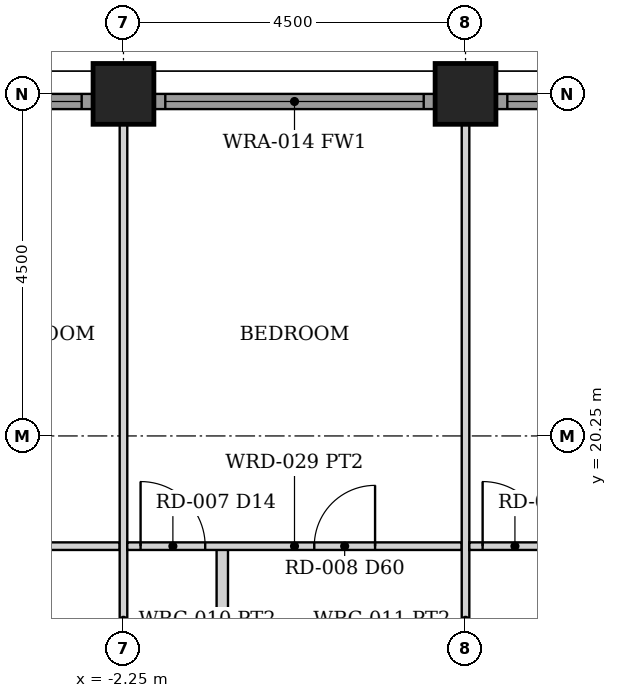
"""IFC4 building model, lengths in metres.
Left out: names, types, materials, properties, quantities, classifications, styles, units other than length and angle.
Written with IfcOpenShell. Run it as: python <this file> out.ifc"""

import sys

from ifc_helpers import new_model, si_unit, direction, frame, frame_2d, origin, origin_2d, place, context, subcontext, project, spatial, rectangle, hollow_rectangle, extrude, element, fill, save


model = new_model("IFC4")
c1 = context("Model", 3, precision=1e-05, world=origin(), true_north=direction((0.0, 1.0)))
c2 = subcontext(c1, "Body", "Model", "MODEL_VIEW")
j1 = project(units=[si_unit("LENGTHUNIT", "METRE"), si_unit("PLANEANGLEUNIT", "RADIAN")], contexts=[c1])
p1 = place(None, origin())
s1 = spatial("IfcSite", under=j1, at=p1, CompositionType="ELEMENT")
p2 = place(p1, origin())
s2 = spatial("IfcBuilding", under=s1, at=p2, CompositionType="ELEMENT")
p3 = place(p2, frame((0.0, 0.0, 58.0)))
s3 = spatial("IfcBuildingStorey", under=s2, at=p3, CompositionType="ELEMENT", Elevation=58.0)
for number, where, z_axis, x_axis in (
    (1, (-2.25, 24.75, 0.0), (0.0, 0.0, 1.0), (0.0, 1.0, 0.0)),
    (2, (2.25, 24.75, 0.0), (0.0, 0.0, 1.0), (0.0, 1.0, 0.0)),
):
    element("IfcColumn", number, at=place(p3, frame(where, z_axis=z_axis, x_axis=x_axis)), inside=s3, PredefinedType="COLUMN", context=c2, shape_type="SweptSolid", body=[
        extrude(hollow_rectangle(XDim=0.8, YDim=0.8, WallThickness=0.06, at=origin_2d()), origin(), (0.0, 0.0, 1.0), 3.5),
    ])
p4 = place(p3, frame((-6.345, 24.65, 0.0), z_axis=(0.0, 0.0, 1.0), x_axis=(1.0, 0.0, 0.0)))
e3 = element("IfcWall", 3, at=p4, inside=s3, PredefinedType="SOLIDWALL", context=c2, shape_type="SweptSolid", body=[
    extrude(rectangle(XDim=3.69, YDim=0.2, at=frame_2d((1.845, 0.0))), origin(), (0.0, 0.0, 1.0), 2.379),
])
p5 = place(p4, frame((0.145, 0.0, 0.3)))
e4 = element("IfcOpeningElement", 4, at=p5, cuts=e3, PredefinedType="OPENING", context=c2, shape_type="SweptSolid", body=[
    extrude(rectangle(XDim=3.4, YDim=1.929, at=frame_2d((1.7, 0.964))), frame((0.0, 0.11, 0.0), z_axis=(0.0, -1.0, 0.0), x_axis=(1.0, 0.0, 0.0)), (0.0, 0.0, 1.0), 0.22),
])
p6 = place(p3, frame((-1.845, 24.65, 0.0), z_axis=(0.0, 0.0, 1.0), x_axis=(1.0, 0.0, 0.0)))
e5 = element("IfcWall", 5, at=p6, inside=s3, PredefinedType="SOLIDWALL", context=c2, shape_type="SweptSolid", body=[
    extrude(rectangle(XDim=3.69, YDim=0.2, at=frame_2d((1.845, 0.0))), origin(), (0.0, 0.0, 1.0), 2.379),
])
p7 = place(p6, frame((0.145, 0.0, 0.3)))
e6 = element("IfcOpeningElement", 6, at=p7, cuts=e5, PredefinedType="OPENING", context=c2, shape_type="SweptSolid", body=[
    extrude(rectangle(XDim=3.4, YDim=1.929, at=frame_2d((1.7, 0.964))), frame((0.0, 0.11, 0.0), z_axis=(0.0, -1.0, 0.0), x_axis=(1.0, 0.0, 0.0)), (0.0, 0.0, 1.0), 0.22),
])
p8 = place(p3, frame((2.655, 24.65, 0.0), z_axis=(0.0, 0.0, 1.0), x_axis=(1.0, 0.0, 0.0)))
e7 = element("IfcWall", 7, at=p8, inside=s3, PredefinedType="SOLIDWALL", context=c2, shape_type="SweptSolid", body=[
    extrude(rectangle(XDim=3.69, YDim=0.2, at=frame_2d((1.845, 0.0))), origin(), (0.0, 0.0, 1.0), 2.379),
])
p9 = place(p8, frame((0.145, 0.0, 0.3)))
e8 = element("IfcOpeningElement", 8, at=p9, cuts=e7, PredefinedType="OPENING", context=c2, shape_type="SweptSolid", body=[
    extrude(rectangle(XDim=3.4, YDim=1.929, at=frame_2d((1.7, 0.964))), frame((0.0, 0.11, 0.0), z_axis=(0.0, -1.0, 0.0), x_axis=(1.0, 0.0, 0.0)), (0.0, 0.0, 1.0), 0.22),
])
p10 = place(p3, frame((-6.69, 18.8, 0.0), z_axis=(0.0, 0.0, 1.0), x_axis=(1.0, 0.0, 0.0)))
e9 = element("IfcWall", 9, at=p10, inside=s3, PredefinedType="PARTITIONING", context=c2, shape_type="SweptSolid", body=[
    extrude(rectangle(XDim=4.39, YDim=0.1, at=frame_2d((2.195, 0.0))), origin(), (0.0, 0.0, 1.0), 2.373),
])
p11 = place(p10, frame((0.14, 0.0, 0.0)))
e10 = element("IfcOpeningElement", 10, at=p11, cuts=e9, PredefinedType="OPENING", context=c2, shape_type="SweptSolid", body=[
    extrude(rectangle(XDim=0.9, YDim=2.1, at=frame_2d((0.45, 1.05))), frame((0.0, 0.06, 0.0), z_axis=(0.0, -1.0, 0.0), x_axis=(1.0, 0.0, 0.0)), (0.0, 0.0, 1.0), 0.12),
])
p12 = place(p3, frame((-2.25, 11.3, 0.0), z_axis=(0.0, 0.0, 1.0), x_axis=(0.0, 1.0, 0.0)))
e11 = element("IfcWall", 11, at=p12, inside=s3, PredefinedType="PARTITIONING", context=c2, shape_type="SweptSolid", body=[
    extrude(rectangle(XDim=13.05, YDim=0.1, at=frame_2d((6.525, 0.0))), origin(), (0.0, 0.0, 1.0), 2.373),
])
p13 = place(p3, frame((-0.95, 11.3, 0.0), z_axis=(0.0, 0.0, 1.0), x_axis=(0.0, 1.0, 0.0)))
e12 = element("IfcWall", 12, at=p13, inside=s3, PredefinedType="PARTITIONING", context=c2, shape_type="SweptSolid", body=[
    extrude(rectangle(XDim=7.5, YDim=0.15, at=frame_2d((3.75, 0.0))), origin(), (0.0, 0.0, 1.0), 2.373),
])
p14 = place(p13, frame((0.85, 0.0, 0.0)))
e13 = element("IfcOpeningElement", 13, at=p14, cuts=e12, PredefinedType="OPENING", context=c2, shape_type="SweptSolid", body=[
    extrude(rectangle(XDim=0.9, YDim=2.1, at=frame_2d((0.45, 1.05))), frame((0.0, 0.085, 0.0), z_axis=(0.0, -1.0, 0.0), x_axis=(1.0, 0.0, 0.0)), (0.0, 0.0, 1.0), 0.17),
])
p15 = place(p3, frame((-2.2, 18.8, 0.0), z_axis=(0.0, 0.0, 1.0), x_axis=(1.0, 0.0, 0.0)))
e14 = element("IfcWall", 14, at=p15, inside=s3, PredefinedType="PARTITIONING", context=c2, shape_type="SweptSolid", body=[
    extrude(rectangle(XDim=4.4, YDim=0.1, at=frame_2d((2.2, 0.0))), origin(), (0.0, 0.0, 1.0), 2.373),
])
p16 = place(p15, frame((0.175, 0.0, 0.0)))
e15 = element("IfcOpeningElement", 15, at=p16, cuts=e14, PredefinedType="OPENING", context=c2, shape_type="SweptSolid", body=[
    extrude(rectangle(XDim=0.85, YDim=2.1, at=frame_2d((0.425, 1.05))), frame((0.0, 0.06, 0.0), z_axis=(0.0, -1.0, 0.0), x_axis=(1.0, 0.0, 0.0)), (0.0, 0.0, 1.0), 0.12),
])
p17 = place(p15, frame((2.46, 0.0, 0.0)))
e16 = element("IfcOpeningElement", 16, at=p17, cuts=e14, PredefinedType="OPENING", context=c2, shape_type="SweptSolid", body=[
    extrude(rectangle(XDim=0.8, YDim=2.1, at=frame_2d((0.4, 1.05))), frame((0.0, 0.06, 0.0), z_axis=(0.0, -1.0, 0.0), x_axis=(1.0, 0.0, 0.0)), (0.0, 0.0, 1.0), 0.12),
])
p18 = place(p3, frame((2.25, 11.3, 0.0), z_axis=(0.0, 0.0, 1.0), x_axis=(0.0, 1.0, 0.0)))
e17 = element("IfcWall", 17, at=p18, inside=s3, PredefinedType="PARTITIONING", context=c2, shape_type="SweptSolid", body=[
    extrude(rectangle(XDim=13.05, YDim=0.1, at=frame_2d((6.525, 0.0))), origin(), (0.0, 0.0, 1.0), 2.373),
])
p19 = place(p3, frame((2.3, 18.8, 0.0), z_axis=(0.0, 0.0, 1.0), x_axis=(1.0, 0.0, 0.0)))
e18 = element("IfcWall", 18, at=p19, inside=s3, PredefinedType="PARTITIONING", context=c2, shape_type="SweptSolid", body=[
    extrude(rectangle(XDim=4.39, YDim=0.1, at=frame_2d((2.195, 0.0))), origin(), (0.0, 0.0, 1.0), 2.373),
])
p20 = place(p19, frame((0.175, 0.0, 0.0)))
e19 = element("IfcOpeningElement", 19, at=p20, cuts=e18, PredefinedType="OPENING", context=c2, shape_type="SweptSolid", body=[
    extrude(rectangle(XDim=0.85, YDim=2.1, at=frame_2d((0.425, 1.05))), frame((0.0, 0.06, 0.0), z_axis=(0.0, -1.0, 0.0), x_axis=(1.0, 0.0, 0.0)), (0.0, 0.0, 1.0), 0.12),
])
p21 = place(p19, frame((2.46, 0.0, 0.0)))
e20 = element("IfcOpeningElement", 20, at=p21, cuts=e18, PredefinedType="OPENING", context=c2, shape_type="SweptSolid", body=[
    extrude(rectangle(XDim=0.8, YDim=2.1, at=frame_2d((0.4, 1.05))), frame((0.0, 0.06, 0.0), z_axis=(0.0, -1.0, 0.0), x_axis=(1.0, 0.0, 0.0)), (0.0, 0.0, 1.0), 0.12),
])
p22 = place(p5, origin())
e21 = element("IfcWindow", 21, at=p22, inside=s3, PartitioningType="SINGLE_PANEL", PredefinedType="WINDOW", context=c2, shape_type="SweptSolid", body=[
    extrude(rectangle(XDim=3.4, YDim=1.929, at=frame_2d((1.7, 0.964))), frame((0.0, 0.03, 0.0), z_axis=(0.0, -1.0, 0.0), x_axis=(1.0, 0.0, 0.0)), (0.0, 0.0, 1.0), 0.06),
])
fill(e4, e21)
p23 = place(p7, origin())
e22 = element("IfcWindow", 22, at=p23, inside=s3, PartitioningType="SINGLE_PANEL", PredefinedType="WINDOW", context=c2, shape_type="SweptSolid", body=[
    extrude(rectangle(XDim=3.4, YDim=1.929, at=frame_2d((1.7, 0.964))), frame((0.0, 0.03, 0.0), z_axis=(0.0, -1.0, 0.0), x_axis=(1.0, 0.0, 0.0)), (0.0, 0.0, 1.0), 0.06),
])
fill(e6, e22)
p24 = place(p9, origin())
e23 = element("IfcWindow", 23, at=p24, inside=s3, PartitioningType="SINGLE_PANEL", PredefinedType="WINDOW", context=c2, shape_type="SweptSolid", body=[
    extrude(rectangle(XDim=3.4, YDim=1.929, at=frame_2d((1.7, 0.964))), frame((0.0, 0.03, 0.0), z_axis=(0.0, -1.0, 0.0), x_axis=(1.0, 0.0, 0.0)), (0.0, 0.0, 1.0), 0.06),
])
fill(e8, e23)
p25 = place(p16, origin())
e24 = element("IfcDoor", 24, at=p25, inside=s3, OperationType="SINGLE_SWING_LEFT", PredefinedType="DOOR", context=c2, shape_type="SweptSolid", body=[
    extrude(rectangle(XDim=0.85, YDim=2.1, at=frame_2d((0.425, 1.05))), frame((0.0, 0.025, 0.0), z_axis=(0.0, -1.0, 0.0), x_axis=(1.0, 0.0, 0.0)), (0.0, 0.0, 1.0), 0.05),
])
fill(e15, e24)
p26 = place(p17, origin())
e25 = element("IfcDoor", 25, at=p26, inside=s3, OperationType="SINGLE_SWING_RIGHT", PredefinedType="DOOR", context=c2, shape_type="SweptSolid", body=[
    extrude(rectangle(XDim=0.8, YDim=2.1, at=frame_2d((0.4, 1.05))), frame((0.0, 0.025, 0.0), z_axis=(0.0, -1.0, 0.0), x_axis=(1.0, 0.0, 0.0)), (0.0, 0.0, 1.0), 0.05),
])
fill(e16, e25)
p27 = place(p20, origin())
e26 = element("IfcDoor", 26, at=p27, inside=s3, OperationType="SINGLE_SWING_LEFT", PredefinedType="DOOR", context=c2, shape_type="SweptSolid", body=[
    extrude(rectangle(XDim=0.85, YDim=2.1, at=frame_2d((0.425, 1.05))), frame((0.0, 0.025, 0.0), z_axis=(0.0, -1.0, 0.0), x_axis=(1.0, 0.0, 0.0)), (0.0, 0.0, 1.0), 0.05),
])
fill(e19, e26)
save(model, sys.argv[1])
